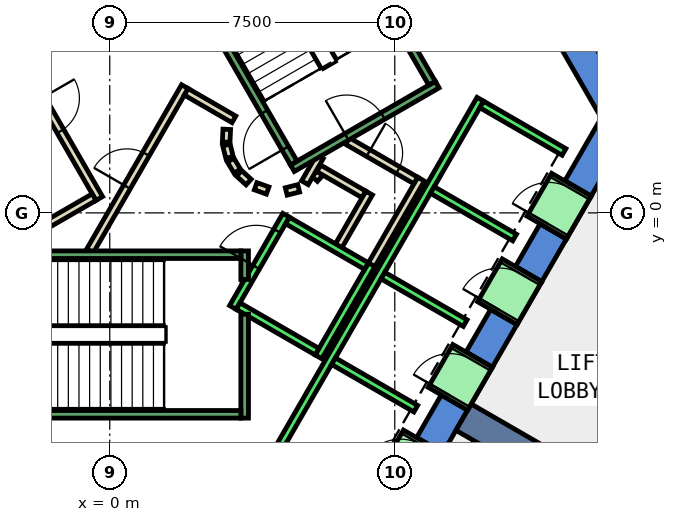
"""IFC4 building model, lengths in metres.
Left out: names, types, materials, properties, quantities, classifications, styles, units other than length and angle.
Written with IfcOpenShell. Run it as: python <this file> out.ifc"""

import sys

from ifc_helpers import new_model, si_unit, direction, frame, frame_2d, origin, place, context, subcontext, project, spatial, polyline, rectangle, outline, extrude, element, fill, save


model = new_model("IFC4")
c1 = context("Model", 3, precision=1e-05, world=origin(), true_north=direction((0.0, 1.0)))
c2 = subcontext(c1, "Body", "Model", "MODEL_VIEW")
j1 = project(units=[si_unit("LENGTHUNIT", "METRE"), si_unit("PLANEANGLEUNIT", "RADIAN")], contexts=[c1])
p1 = place(None, origin())
s1 = spatial("IfcSite", under=j1, at=p1, CompositionType="ELEMENT")
p2 = place(p1, origin())
s2 = spatial("IfcBuilding", under=s1, at=p2, CompositionType="ELEMENT")
p3 = place(p2, frame((0.0, 0.0, 163.4)))
s3 = spatial("IfcBuildingStorey", under=s2, at=p3, CompositionType="ELEMENT", Elevation=163.4)
p4 = place(p3, frame((0.0, 0.0, -0.4)))
e1 = element("IfcWall", 1, at=p4, inside=s3, PredefinedType="SHEAR", context=c2, shape_type="SweptSolid", body=[
    extrude(outline(polyline([(8.517, 11.748), (7.824, 11.348), (12.933, 2.5), (13.856, 2.5), (8.517, 11.748)])), origin(), (0.0, 0.0, 1.0), 4.2),
])
p5 = place(p3, frame((0.0, 0.0, -0.4)))
e2 = element("IfcWall", 2, at=p5, inside=s3, PredefinedType="SHEAR", context=c2, shape_type="SweptSolid", body=[
    extrude(outline(polyline([(9.417, -5.189), (8.724, -4.789), (8.075, -5.914), (8.767, -6.314), (9.417, -5.189)])), origin(), (0.0, 0.0, 1.0), 4.2),
])
p6 = place(p3, frame((0.0, 0.0, -0.4)))
e3 = element("IfcWall", 3, at=p6, inside=s3, PredefinedType="SHEAR", context=c2, shape_type="SweptSolid", body=[
    extrude(outline(polyline([(10.717, -2.937), (10.025, -2.537), (9.374, -3.663), (10.067, -4.063), (10.717, -2.937)])), origin(), (0.0, 0.0, 1.0), 4.2),
])
p7 = place(p3, frame((0.0, 0.0, -0.4)))
e4 = element("IfcWall", 4, at=p7, inside=s3, PredefinedType="SHEAR", context=c2, shape_type="SweptSolid", body=[
    extrude(outline(polyline([(12.017, -0.686), (11.324, -0.286), (10.675, -1.411), (11.367, -1.811), (12.017, -0.686)])), origin(), (0.0, 0.0, 1.0), 4.2),
])
p8 = place(p3, frame((0.0, 0.0, -0.4)))
e5 = element("IfcWall", 5, at=p8, inside=s3, PredefinedType="SHEAR", context=c2, shape_type="SweptSolid", body=[
    extrude(outline(polyline([(11.974, 0.84), (12.667, 0.44), (13.856, 2.5), (12.933, 2.5), (11.974, 0.84)])), origin(), (0.0, 0.0, 1.0), 4.2),
])
p9 = place(p3, frame((0.0, 0.0, 3.6)))
e6 = element("IfcWall", 6, at=p9, inside=s3, PredefinedType="SHEAR", context=c2, shape_type="SweptSolid", body=[
    extrude(outline(polyline([(8.767, -6.314), (8.075, -5.914), (7.424, -7.04), (8.117, -7.44), (8.767, -6.314)])), origin(), (0.0, 0.0, 1.0), 0.2),
])
p10 = place(p3, frame((0.0, 0.0, 3.6)))
e7 = element("IfcWall", 7, at=p10, inside=s3, PredefinedType="SHEAR", context=c2, shape_type="SweptSolid", body=[
    extrude(outline(polyline([(10.067, -4.063), (9.374, -3.663), (8.724, -4.789), (9.417, -5.189), (10.067, -4.063)])), origin(), (0.0, 0.0, 1.0), 0.2),
])
p11 = place(p3, frame((0.0, 0.0, 3.6)))
e8 = element("IfcWall", 8, at=p11, inside=s3, PredefinedType="SHEAR", context=c2, shape_type="SweptSolid", body=[
    extrude(outline(polyline([(11.367, -1.811), (10.675, -1.411), (10.025, -2.537), (10.717, -2.937), (11.367, -1.811)])), origin(), (0.0, 0.0, 1.0), 0.2),
])
p12 = place(p3, frame((0.0, 0.0, 3.6)))
e9 = element("IfcWall", 9, at=p12, inside=s3, PredefinedType="SHEAR", context=c2, shape_type="SweptSolid", body=[
    extrude(outline(polyline([(12.667, 0.44), (11.974, 0.84), (11.324, -0.286), (12.017, -0.686), (12.667, 0.44)])), origin(), (0.0, 0.0, 1.0), 0.2),
])
p13 = place(p3, frame((9.31, -5.375, -0.4), z_axis=(0.0, 0.0, 1.0), x_axis=(0.866017533419, -0.500013631625, 0.0)))
e10 = element("IfcWall", 10, at=p13, inside=s3, PredefinedType="SHEAR", context=c2, shape_type="SweptSolid", body=[
    extrude(rectangle(XDim=9.0, YDim=0.8, at=frame_2d((4.5, 0.0))), origin(), (0.0, 0.0, 1.0), 4.2),
])
p14 = place(p3, frame((5.39, 0.898, 0.0), z_axis=(0.0, 0.0, 1.0), x_axis=(0.673828488714, 0.738887791073, 0.0)))
e11 = element("IfcWall", 11, at=p14, inside=s3, PredefinedType="PARTITIONING", context=c2, shape_type="SweptSolid", body=[
    extrude(rectangle(XDim=0.263, YDim=0.2, at=frame_2d((0.131, 0.0))), origin(), (0.0, 0.0, 1.0), 3.8),
])
p15 = place(p3, frame((5.499, 1.172, 0.0), z_axis=(0.0, 0.0, 1.0), x_axis=(0.866333505267, -0.499465972466, 0.0)))
e12 = element("IfcWall", 12, at=p15, inside=s3, PredefinedType="PARTITIONING", context=c2, shape_type="SweptSolid", body=[
    extrude(rectangle(XDim=1.374, YDim=0.2, at=frame_2d((0.687, 0.0))), origin(), (0.0, 0.0, 1.0), 3.8),
])
p16 = place(p3, frame((6.826, 0.522, 0.0), z_axis=(0.0, 0.0, 1.0), x_axis=(-0.500016722714, -0.866015748706, 0.0)))
e13 = element("IfcWall", 13, at=p16, inside=s3, PredefinedType="PARTITIONING", context=c2, shape_type="SweptSolid", body=[
    extrude(rectangle(XDim=1.7, YDim=0.2, at=frame_2d((0.85, 0.0))), origin(), (0.0, 0.0, 1.0), 3.8),
])
p17 = place(p3, frame((6.25, 1.894, 0.0), z_axis=(0.0, 0.0, 1.0), x_axis=(0.866043184279, -0.499969202016, 0.0)))
e14 = element("IfcWall", 14, at=p17, inside=s3, PredefinedType="PARTITIONING", context=c2, shape_type="SweptSolid", body=[
    extrude(rectangle(XDim=2.084, YDim=0.2, at=frame_2d((1.042, 0.0))), origin(), (0.0, 0.0, 1.0), 3.8),
])
p18 = place(p17, frame((0.642, 0.0, 0.0)))
e15 = element("IfcOpeningElement", 15, at=p18, cuts=e14, PredefinedType="OPENING", context=c2, shape_type="SweptSolid", body=[
    extrude(rectangle(XDim=0.9, YDim=2.1, at=frame_2d((0.45, 1.05))), frame((0.0, 0.11, 0.0), z_axis=(0.0, -1.0, 0.0), x_axis=(1.0, 0.0, 0.0)), (0.0, 0.0, 1.0), 0.22),
])
p19 = place(p3, frame((8.192, 0.888, 0.0), z_axis=(0.0, 0.0, 1.0), x_axis=(-0.499940625693, -0.866059680843, 0.0)))
e16 = element("IfcWall", 16, at=p19, inside=s3, PredefinedType="PARTITIONING", context=c2, shape_type="SweptSolid", body=[
    extrude(rectangle(XDim=2.68, YDim=0.2, at=frame_2d((1.34, 0.0))), origin(), (0.0, 0.0, 1.0), 3.8),
])
p20 = place(p3, frame((5.135, 0.793, 0.0), z_axis=(0.0, 0.0, 1.0), x_axis=(0.499526442893, 0.866298639529, 0.0)))
e17 = element("IfcWall", 17, at=p20, inside=s3, PredefinedType="PARTITIONING", context=c2, shape_type="SweptSolid", body=[
    extrude(rectangle(XDim=0.791, YDim=0.2, at=frame_2d((0.396, 0.0))), origin(), (0.0, 0.0, 1.0), 3.8),
])
p21 = place(p3, frame((-0.52, -1.0, 0.0), z_axis=(0.0, 0.0, 1.0), x_axis=(0.50011622646, 0.865958290007, 0.0)))
e18 = element("IfcWall", 18, at=p21, inside=s3, PredefinedType="PARTITIONING", context=c2, shape_type="SweptSolid", body=[
    extrude(rectangle(XDim=4.991, YDim=0.2, at=frame_2d((2.496, 0.0))), origin(), (0.0, 0.0, 1.0), 3.8),
])
p22 = place(p21, frame((1.945, 0.0, 0.0)))
e19 = element("IfcOpeningElement", 19, at=p22, cuts=e18, PredefinedType="OPENING", context=c2, shape_type="SweptSolid", body=[
    extrude(rectangle(XDim=1.0, YDim=2.1, at=frame_2d((0.5, 1.05))), frame((0.0, 0.11, 0.0), z_axis=(0.0, -1.0, 0.0), x_axis=(1.0, 0.0, 0.0)), (0.0, 0.0, 1.0), 0.22),
])
p23 = place(p3, frame((2.012, 3.186, 0.0), z_axis=(0.0, 0.0, 1.0), x_axis=(0.865891012941, -0.500232699559, 0.0)))
e20 = element("IfcWall", 20, at=p23, inside=s3, PredefinedType="PARTITIONING", context=c2, shape_type="SweptSolid", body=[
    extrude(rectangle(XDim=1.449, YDim=0.2, at=frame_2d((0.725, 0.0))), origin(), (0.0, 0.0, 1.0), 3.8),
])
p24 = place(p3, frame((3.079, 2.199, 0.0), z_axis=(0.0, 0.0, 1.0), x_axis=(-0.047771483479, -0.998858290933, 0.0)))
e21 = element("IfcWall", 21, at=p24, inside=s3, PredefinedType="PARTITIONING", context=c2, shape_type="SweptSolid", body=[
    extrude(rectangle(XDim=0.337, YDim=0.2, at=frame_2d((0.169, 0.0))), origin(), (0.0, 0.0, 1.0), 3.8),
])
p25 = place(p3, frame((3.07, 1.786, 0.0), z_axis=(0.0, 0.0, 1.0), x_axis=(0.242705583207, -0.970099994784, 0.0)))
e22 = element("IfcWall", 22, at=p25, inside=s3, PredefinedType="PARTITIONING", context=c2, shape_type="SweptSolid", body=[
    extrude(rectangle(XDim=0.338, YDim=0.2, at=frame_2d((0.169, 0.0))), origin(), (0.0, 0.0, 1.0), 3.8),
])
for number, where, z_axis, x_axis in (
    (23, (3.182, 1.388, 0.0), (0.0, 0.0, 1.0), (0.512, -0.859, 0.0)),
    (24, (3.404, 1.039, 0.0), (0.0, 0.0, 1.0), (0.74, -0.672, 0.0)),
):
    element("IfcWall", number, at=place(p3, frame(where, z_axis=z_axis, x_axis=x_axis)), inside=s3, PredefinedType="PARTITIONING", context=c2, shape_type="SweptSolid", body=[
        extrude(rectangle(XDim=0.338, YDim=0.2, at=frame_2d((0.169, 0.0))), origin(), (0.0, 0.0, 1.0), 3.8),
    ])
p26 = place(p3, frame((3.838, 0.702, 0.0), z_axis=(0.0, 0.0, 1.0), x_axis=(0.941035081519, -0.338308993895, 0.0)))
e25 = element("IfcWall", 25, at=p26, inside=s3, PredefinedType="PARTITIONING", context=c2, shape_type="SweptSolid", body=[
    extrude(rectangle(XDim=0.337, YDim=0.2, at=frame_2d((0.168, 0.0))), origin(), (0.0, 0.0, 1.0), 3.8),
])
p27 = place(p3, frame((4.644, 0.564, 0.0), z_axis=(0.0, 0.0, 1.0), x_axis=(0.969929076366, 0.243387729394, 0.0)))
e26 = element("IfcWall", 26, at=p27, inside=s3, PredefinedType="PARTITIONING", context=c2, shape_type="SweptSolid", body=[
    extrude(rectangle(XDim=0.337, YDim=0.2, at=frame_2d((0.168, 0.0))), origin(), (0.0, 0.0, 1.0), 3.8),
])
p28 = place(p3, frame((-2.771, 4.7, 0.0), z_axis=(0.0, 0.0, 1.0), x_axis=(0.499969479948, -0.866043023828, 0.0)))
e27 = element("IfcWall", 27, at=p28, inside=s3, PredefinedType="PARTITIONING", context=c2, shape_type="SweptSolid", body=[
    extrude(rectangle(XDim=4.99, YDim=0.2, at=frame_2d((2.495, 0.0))), origin(), (0.0, 0.0, 1.0), 3.8),
])
p29 = place(p28, frame((1.945, 0.0, 0.0)))
e28 = element("IfcOpeningElement", 28, at=p29, cuts=e27, PredefinedType="OPENING", context=c2, shape_type="SweptSolid", body=[
    extrude(rectangle(XDim=1.0, YDim=2.1, at=frame_2d((0.5, 1.05))), frame((0.0, 0.11, 0.0), z_axis=(0.0, -1.0, 0.0), x_axis=(1.0, 0.0, 0.0)), (0.0, 0.0, 1.0), 0.22),
])
p30 = place(p3, frame((-0.412, 0.414, 0.0), z_axis=(0.0, 0.0, 1.0), x_axis=(-0.866017369001, -0.500013916395, 0.0)))
e29 = element("IfcWall", 29, at=p30, inside=s3, PredefinedType="PARTITIONING", context=c2, shape_type="SweptSolid", body=[
    extrude(rectangle(XDim=1.45, YDim=0.2, at=frame_2d((0.725, 0.0))), origin(), (0.0, 0.0, 1.0), 3.8),
])
p31 = place(p3, frame((18.0, 2.077, 0.0), z_axis=(0.0, 0.0, 1.0), x_axis=(-0.499959557847, -0.866048751813, 0.0)))
e30 = element("IfcWall", 30, at=p31, inside=s3, PredefinedType="PARTITIONING", context=c2, shape_type="SweptSolid", body=[
    extrude(rectangle(XDim=10.399, YDim=0.2, at=frame_2d((5.199, 0.0))), origin(), (0.0, 0.0, 1.0), 3.8),
])
p32 = place(p3, frame((3.24, -2.488, 0.0), z_axis=(0.0, 0.0, 1.0), x_axis=(0.49994636267, 0.866056369097, 0.0)))
e31 = element("IfcWall", 31, at=p32, inside=s3, PredefinedType="STANDARD", context=c2, shape_type="SweptSolid", body=[
    extrude(rectangle(XDim=2.8, YDim=0.2, at=frame_2d((1.4, 0.0))), origin(), (0.0, 0.0, 1.0), 3.8),
])
p33 = place(p32, frame((1.225, 0.0, 0.0)))
e32 = element("IfcOpeningElement", 32, at=p33, cuts=e31, PredefinedType="OPENING", context=c2, shape_type="SweptSolid", body=[
    extrude(rectangle(XDim=1.1, YDim=2.1, at=frame_2d((0.55, 1.05))), frame((0.0, 0.11, 0.0), z_axis=(0.0, -1.0, 0.0), x_axis=(1.0, 0.0, 0.0)), (0.0, 0.0, 1.0), 0.22),
])
p34 = place(p3, frame((5.492, -3.788, 0.0), z_axis=(0.0, 0.0, 1.0), x_axis=(0.500011755427, 0.866018616679, 0.0)))
e33 = element("IfcWall", 33, at=p34, inside=s3, PredefinedType="STANDARD", context=c2, shape_type="SweptSolid", body=[
    extrude(rectangle(XDim=2.8, YDim=0.2, at=frame_2d((1.4, 0.0))), origin(), (0.0, 0.0, 1.0), 3.8),
])
p35 = place(p3, frame((3.377, -2.452, 0.0), z_axis=(0.0, 0.0, 1.0), x_axis=(0.865955154139, -0.50012165622, 0.0)))
e34 = element("IfcWall", 34, at=p35, inside=s3, PredefinedType="STANDARD", context=c2, shape_type="SweptSolid", body=[
    extrude(rectangle(XDim=2.4, YDim=0.2, at=frame_2d((1.2, 0.0))), origin(), (0.0, 0.0, 1.0), 3.8),
])
p36 = place(p3, frame((4.677, -0.2, 0.0), z_axis=(0.0, 0.0, 1.0), x_axis=(0.865973769406, -0.500089422704, 0.0)))
e35 = element("IfcWall", 35, at=p36, inside=s3, PredefinedType="STANDARD", context=c2, shape_type="SweptSolid", body=[
    extrude(rectangle(XDim=2.399, YDim=0.2, at=frame_2d((1.2, 0.0))), origin(), (0.0, 0.0, 1.0), 3.8),
])
p37 = place(p3, frame((4.451, -6.19, 0.0), z_axis=(0.0, 0.0, 1.0), x_axis=(0.50000090737, 0.866024879913, 0.0)))
e36 = element("IfcWall", 36, at=p37, inside=s3, PredefinedType="STANDARD", context=c2, shape_type="SweptSolid", body=[
    extrude(rectangle(XDim=10.6, YDim=0.2, at=frame_2d((5.3, 0.0))), origin(), (0.0, 0.0, 1.0), 3.8),
])
for number, where, z_axis, x_axis in (
    (37, (5.888, -3.902, 0.0), (0.0, 0.0, 1.0), (0.866, -0.5, 0.0)),
    (38, (7.188, -1.65, 0.0), (0.0, 0.0, 1.0), (0.866, -0.5, 0.0)),
    (39, (8.488, 0.602, 0.0), (0.0, 0.0, 1.0), (0.866, -0.5, 0.0)),
):
    element("IfcWall", number, at=place(p3, frame(where, z_axis=z_axis, x_axis=x_axis)), inside=s3, PredefinedType="STANDARD", context=c2, shape_type="SweptSolid", body=[
        extrude(rectangle(XDim=2.5, YDim=0.2, at=frame_2d((1.25, 0.0))), origin(), (0.0, 0.0, 1.0), 3.8),
    ])
p38 = place(p3, frame((9.788, 2.853, 0.0), z_axis=(0.0, 0.0, 1.0), x_axis=(0.865998541277, -0.500046524342, 0.0)))
e40 = element("IfcWall", 40, at=p38, inside=s3, PredefinedType="STANDARD", context=c2, shape_type="SweptSolid", body=[
    extrude(rectangle(XDim=2.5, YDim=0.2, at=frame_2d((1.25, 0.0))), origin(), (0.0, 0.0, 1.0), 3.8),
])
p39 = place(p3, frame((7.598, -7.14, 0.0), z_axis=(0.0, 0.0, 1.0), x_axis=(0.500362116554, 0.865816234728, 0.0)))
e41 = element("IfcWall", 41, at=p39, inside=s3, PredefinedType="STANDARD", context=c2, shape_type="SweptSolid", body=[
    extrude(rectangle(XDim=1.299, YDim=1.2, at=frame_2d((0.65, 0.0))), origin(), (0.0, 0.0, 1.0), 2.4),
])
p40 = place(p39, frame((0.1, 0.0, 0.0)))
e42 = element("IfcOpeningElement", 42, at=p40, cuts=e41, PredefinedType="OPENING", context=c2, shape_type="SweptSolid", body=[
    extrude(rectangle(XDim=1.1, YDim=2.3, at=frame_2d((0.55, 1.15))), frame((0.0, 0.61, 0.0), z_axis=(0.0, -1.0, 0.0), x_axis=(1.0, 0.0, 0.0)), (0.0, 0.0, 1.0), 1.22),
])
p41 = place(p3, frame((8.898, -4.889, 0.0), z_axis=(0.0, 0.0, 1.0), x_axis=(0.500036693733, 0.866004217611, 0.0)))
e43 = element("IfcWall", 43, at=p41, inside=s3, PredefinedType="STANDARD", context=c2, shape_type="SweptSolid", body=[
    extrude(rectangle(XDim=1.3, YDim=1.2, at=frame_2d((0.65, 0.0))), origin(), (0.0, 0.0, 1.0), 2.4),
])
p42 = place(p41, frame((0.1, 0.0, 0.0)))
e44 = element("IfcOpeningElement", 44, at=p42, cuts=e43, PredefinedType="OPENING", context=c2, shape_type="SweptSolid", body=[
    extrude(rectangle(XDim=1.1, YDim=2.3, at=frame_2d((0.55, 1.15))), frame((0.0, 0.61, 0.0), z_axis=(0.0, -1.0, 0.0), x_axis=(1.0, 0.0, 0.0)), (0.0, 0.0, 1.0), 1.22),
])
p43 = place(p3, frame((10.198, -2.637, 0.0), z_axis=(0.0, 0.0, 1.0), x_axis=(0.49989585183, 0.866085525409, 0.0)))
e45 = element("IfcWall", 45, at=p43, inside=s3, PredefinedType="STANDARD", context=c2, shape_type="SweptSolid", body=[
    extrude(rectangle(XDim=1.3, YDim=1.2, at=frame_2d((0.65, 0.0))), origin(), (0.0, 0.0, 1.0), 2.4),
])
p44 = place(p43, frame((0.1, 0.0, 0.0)))
e46 = element("IfcOpeningElement", 46, at=p44, cuts=e45, PredefinedType="OPENING", context=c2, shape_type="SweptSolid", body=[
    extrude(rectangle(XDim=1.1, YDim=2.3, at=frame_2d((0.55, 1.15))), frame((0.0, 0.61, 0.0), z_axis=(0.0, -1.0, 0.0), x_axis=(1.0, 0.0, 0.0)), (0.0, 0.0, 1.0), 1.22),
])
p45 = place(p3, frame((11.498, -0.385, 0.0), z_axis=(0.0, 0.0, 1.0), x_axis=(0.500221244143, 0.865897630733, 0.0)))
e47 = element("IfcWall", 47, at=p45, inside=s3, PredefinedType="STANDARD", context=c2, shape_type="SweptSolid", body=[
    extrude(rectangle(XDim=1.299, YDim=1.2, at=frame_2d((0.65, 0.0))), origin(), (0.0, 0.0, 1.0), 2.4),
])
p46 = place(p45, frame((0.1, 0.0, 0.0)))
e48 = element("IfcOpeningElement", 48, at=p46, cuts=e47, PredefinedType="OPENING", context=c2, shape_type="SweptSolid", body=[
    extrude(rectangle(XDim=1.1, YDim=2.3, at=frame_2d((0.55, 1.15))), frame((0.0, 0.61, 0.0), z_axis=(0.0, -1.0, 0.0), x_axis=(1.0, 0.0, 0.0)), (0.0, 0.0, 1.0), 1.22),
])
p47 = place(p3, frame((3.55, -2.667, 0.0), z_axis=(0.0, 0.0, 1.0), x_axis=(0.0, -1.0, 0.0)))
e49 = element("IfcWall", 49, at=p47, inside=s3, PredefinedType="STANDARD", context=c2, shape_type="SweptSolid", body=[
    extrude(rectangle(XDim=2.733, YDim=0.2, at=frame_2d((1.366, 0.0))), origin(), (0.0, 0.0, 1.0), 3.8),
])
p48 = place(p3, frame((3.55, -1.0, 0.0), z_axis=(0.0, 0.0, 1.0), x_axis=(0.0, -1.0, 0.0)))
e50 = element("IfcWall", 50, at=p48, inside=s3, PredefinedType="STANDARD", context=c2, shape_type="SweptSolid", body=[
    extrude(rectangle(XDim=0.751, YDim=0.2, at=frame_2d((0.375, 0.0))), origin(), (0.0, 0.0, 1.0), 3.8),
])
p49 = place(p3, frame((-3.45, -1.1, 0.0), z_axis=(0.0, 0.0, 1.0), x_axis=(1.0, 0.0, 0.0)))
e51 = element("IfcWall", 51, at=p49, inside=s3, PredefinedType="STANDARD", context=c2, shape_type="SweptSolid", body=[
    extrude(rectangle(XDim=6.9, YDim=0.2, at=frame_2d((3.45, 0.0))), origin(), (0.0, 0.0, 1.0), 3.8),
])
p50 = place(p49, frame((0.45, 0.0, 0.0)))
e52 = element("IfcOpeningElement", 52, at=p50, cuts=e51, PredefinedType="OPENING", context=c2, shape_type="SweptSolid", body=[
    extrude(rectangle(XDim=1.1, YDim=2.2, at=frame_2d((0.55, 1.1))), frame((0.0, 0.11, 0.0), z_axis=(0.0, -1.0, 0.0), x_axis=(1.0, 0.0, 0.0)), (0.0, 0.0, 1.0), 0.22),
])
p51 = place(p3, frame((-3.45, -5.3, 0.0), z_axis=(0.0, 0.0, 1.0), x_axis=(1.0, 0.0, 0.0)))
e53 = element("IfcWall", 53, at=p51, inside=s3, PredefinedType="STANDARD", context=c2, shape_type="SweptSolid", body=[
    extrude(rectangle(XDim=6.9, YDim=0.2, at=frame_2d((3.45, 0.0))), origin(), (0.0, 0.0, 1.0), 3.8),
])
p52 = place(p3, frame((4.806, 1.176, 0.0), z_axis=(0.0, 0.0, 1.0), x_axis=(0.866059941101, 0.499940174841, 0.0)))
e54 = element("IfcWall", 54, at=p52, inside=s3, PredefinedType="STANDARD", context=c2, shape_type="SweptSolid", body=[
    extrude(rectangle(XDim=4.4, YDim=0.2, at=frame_2d((2.2, 0.0))), origin(), (0.0, 0.0, 1.0), 3.8),
])
p53 = place(p52, frame((1.65, 0.0, 0.0)))
e55 = element("IfcOpeningElement", 55, at=p53, cuts=e54, PredefinedType="OPENING", context=c2, shape_type="SweptSolid", body=[
    extrude(rectangle(XDim=1.1, YDim=2.2, at=frame_2d((0.55, 1.1))), frame((0.0, 0.11, 0.0), z_axis=(0.0, -1.0, 0.0), x_axis=(1.0, 0.0, 0.0)), (0.0, 0.0, 1.0), 0.22),
])
p54 = place(p3, frame((4.843, 1.312, 0.0), z_axis=(0.0, 0.0, 1.0), x_axis=(-0.499963383562, 0.866046543262, 0.0)))
e56 = element("IfcWall", 56, at=p54, inside=s3, PredefinedType="STANDARD", context=c2, shape_type="SweptSolid", body=[
    extrude(rectangle(XDim=6.9, YDim=0.2, at=frame_2d((3.45, 0.0))), origin(), (0.0, 0.0, 1.0), 3.8),
])
p55 = place(p54, frame((0.45, 0.0, 0.0)))
e57 = element("IfcOpeningElement", 57, at=p55, cuts=e56, PredefinedType="OPENING", context=c2, shape_type="SweptSolid", body=[
    extrude(rectangle(XDim=1.1, YDim=2.2, at=frame_2d((0.55, 1.1))), frame((0.0, 0.11, 0.0), z_axis=(0.0, -1.0, 0.0), x_axis=(1.0, 0.0, 0.0)), (0.0, 0.0, 1.0), 0.22),
])
p56 = place(p3, frame((8.48, 3.412, 0.0), z_axis=(0.0, 0.0, 1.0), x_axis=(-0.499978703459, 0.866037698999, 0.0)))
e58 = element("IfcWall", 58, at=p56, inside=s3, PredefinedType="STANDARD", context=c2, shape_type="SweptSolid", body=[
    extrude(rectangle(XDim=6.9, YDim=0.2, at=frame_2d((3.45, 0.0))), origin(), (0.0, 0.0, 1.0), 3.8),
])
p57 = place(p3, frame((-1.393, 7.288, 0.0), z_axis=(0.0, 0.0, 1.0), x_axis=(-0.499963383562, -0.866046543262, 0.0)))
e59 = element("IfcWall", 59, at=p57, inside=s3, PredefinedType="STANDARD", context=c2, shape_type="SweptSolid", body=[
    extrude(rectangle(XDim=6.9, YDim=0.2, at=frame_2d((3.45, 0.0))), origin(), (0.0, 0.0, 1.0), 3.8),
])
p58 = place(p57, frame((0.45, 0.0, 0.0)))
e60 = element("IfcOpeningElement", 60, at=p58, cuts=e59, PredefinedType="OPENING", context=c2, shape_type="SweptSolid", body=[
    extrude(rectangle(XDim=1.1, YDim=2.2, at=frame_2d((0.55, 1.1))), frame((0.0, 0.11, 0.0), z_axis=(0.0, -1.0, 0.0), x_axis=(1.0, 0.0, 0.0)), (0.0, 0.0, 1.0), 0.22),
])
p59 = place(p22, origin())
e61 = element("IfcDoor", 61, at=p59, inside=s3, OperationType="SINGLE_SWING_LEFT", PredefinedType="DOOR", context=c2, shape_type="SweptSolid", body=[
    extrude(rectangle(XDim=1.0, YDim=2.1, at=frame_2d((0.5, 1.05))), frame((0.0, 0.025, 0.0), z_axis=(0.0, -1.0, 0.0), x_axis=(1.0, 0.0, 0.0)), (0.0, 0.0, 1.0), 0.05),
])
fill(e19, e61)
p60 = place(p29, origin())
e62 = element("IfcDoor", 62, at=p60, inside=s3, OperationType="SINGLE_SWING_RIGHT", PredefinedType="DOOR", context=c2, shape_type="SweptSolid", body=[
    extrude(rectangle(XDim=1.0, YDim=2.1, at=frame_2d((0.5, 1.05))), frame((0.0, 0.025, 0.0), z_axis=(0.0, -1.0, 0.0), x_axis=(1.0, 0.0, 0.0)), (0.0, 0.0, 1.0), 0.05),
])
fill(e28, e62)
p61 = place(p18, origin())
e63 = element("IfcDoor", 63, at=p61, inside=s3, OperationType="SINGLE_SWING_LEFT", PredefinedType="DOOR", context=c2, shape_type="SweptSolid", body=[
    extrude(rectangle(XDim=0.9, YDim=2.1, at=frame_2d((0.45, 1.05))), frame((0.0, 0.025, 0.0), z_axis=(0.0, -1.0, 0.0), x_axis=(1.0, 0.0, 0.0)), (0.0, 0.0, 1.0), 0.05),
])
fill(e15, e63)
p62 = place(p42, origin())
e64 = element("IfcDoor", 64, at=p62, inside=s3, OperationType="SLIDING_TO_LEFT", PredefinedType="DOOR", context=c2, shape_type="SweptSolid", body=[
    extrude(rectangle(XDim=1.1, YDim=2.3, at=frame_2d((0.55, 1.15))), frame((0.0, 0.025, 0.0), z_axis=(0.0, -1.0, 0.0), x_axis=(1.0, 0.0, 0.0)), (0.0, 0.0, 1.0), 0.05),
])
fill(e44, e64)
p63 = place(p44, origin())
e65 = element("IfcDoor", 65, at=p63, inside=s3, OperationType="SLIDING_TO_LEFT", PredefinedType="DOOR", context=c2, shape_type="SweptSolid", body=[
    extrude(rectangle(XDim=1.1, YDim=2.3, at=frame_2d((0.55, 1.15))), frame((0.0, 0.025, 0.0), z_axis=(0.0, -1.0, 0.0), x_axis=(1.0, 0.0, 0.0)), (0.0, 0.0, 1.0), 0.05),
])
fill(e46, e65)
p64 = place(p46, origin())
e66 = element("IfcDoor", 66, at=p64, inside=s3, OperationType="SLIDING_TO_LEFT", PredefinedType="DOOR", context=c2, shape_type="SweptSolid", body=[
    extrude(rectangle(XDim=1.1, YDim=2.3, at=frame_2d((0.55, 1.15))), frame((0.0, 0.025, 0.0), z_axis=(0.0, -1.0, 0.0), x_axis=(1.0, 0.0, 0.0)), (0.0, 0.0, 1.0), 0.05),
])
fill(e48, e66)
p65 = place(p33, origin())
e67 = element("IfcDoor", 67, at=p65, inside=s3, OperationType="SLIDING_TO_LEFT", PredefinedType="DOOR", context=c2, shape_type="SweptSolid", body=[
    extrude(rectangle(XDim=1.1, YDim=2.1, at=frame_2d((0.55, 1.05))), frame((0.0, 0.025, 0.0), z_axis=(0.0, -1.0, 0.0), x_axis=(1.0, 0.0, 0.0)), (0.0, 0.0, 1.0), 0.05),
])
fill(e32, e67)
p66 = place(p55, origin())
e68 = element("IfcDoor", 68, at=p66, inside=s3, OperationType="SINGLE_SWING_LEFT", PredefinedType="DOOR", context=c2, shape_type="SweptSolid", body=[
    extrude(rectangle(XDim=1.1, YDim=2.2, at=frame_2d((0.55, 1.1))), frame((0.0, 0.025, 0.0), z_axis=(0.0, -1.0, 0.0), x_axis=(1.0, 0.0, 0.0)), (0.0, 0.0, 1.0), 0.05),
])
fill(e57, e68)
p67 = place(p53, origin())
e69 = element("IfcDoor", 69, at=p67, inside=s3, OperationType="SINGLE_SWING_LEFT", PredefinedType="DOOR", context=c2, shape_type="SweptSolid", body=[
    extrude(rectangle(XDim=1.1, YDim=2.2, at=frame_2d((0.55, 1.1))), frame((0.0, 0.025, 0.0), z_axis=(0.0, -1.0, 0.0), x_axis=(1.0, 0.0, 0.0)), (0.0, 0.0, 1.0), 0.05),
])
fill(e55, e69)
save(model, sys.argv[1])
